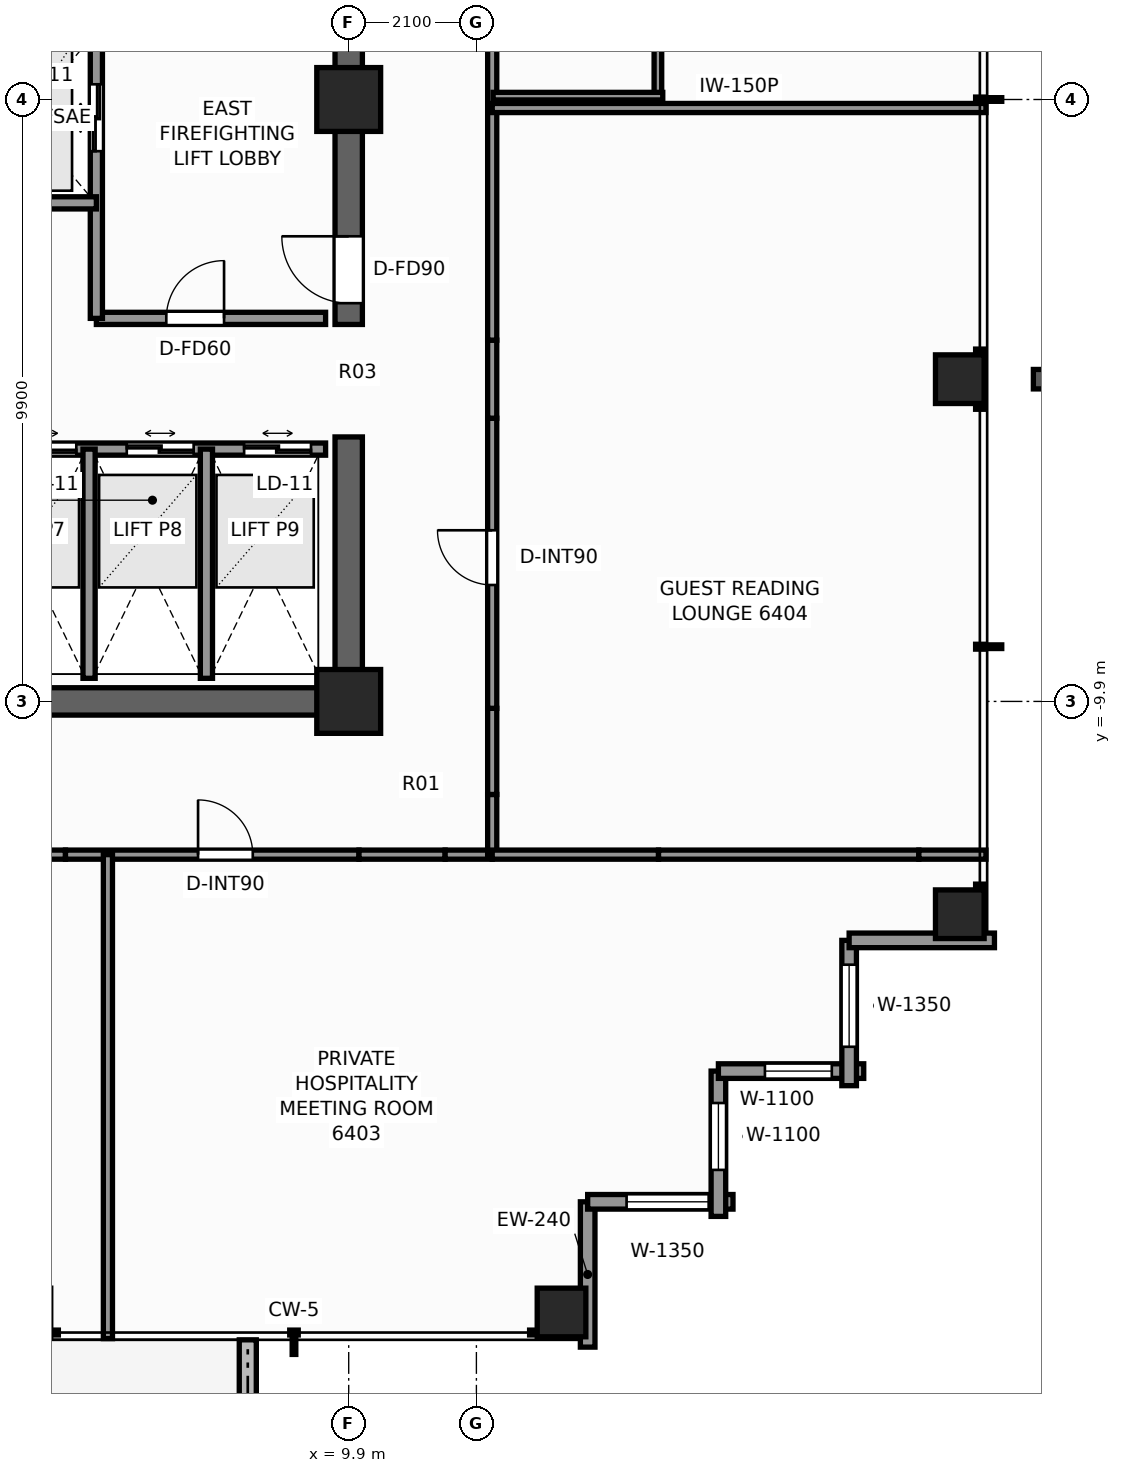
"""IFC4 building model, lengths in metres.
Left out: names, types, materials, properties, quantities, classifications, styles, units other than length and angle.
Written with IfcOpenShell. Run it as: python <this file> out.ifc"""

import sys

from ifc_helpers import new_model, si_unit, direction, frame, frame_2d, origin, origin_2d, place, context, subcontext, project, spatial, rectangle, extrude, element, fill, save


model = new_model("IFC4")
c1 = context("Model", 3, precision=1e-05, world=origin(), true_north=direction((0.0, 1.0)))
c2 = subcontext(c1, "Body", "Model", "MODEL_VIEW")
j1 = project(units=[si_unit("LENGTHUNIT", "METRE"), si_unit("PLANEANGLEUNIT", "RADIAN")], contexts=[c1])
p1 = place(None, origin())
s1 = spatial("IfcSite", under=j1, at=p1, CompositionType="ELEMENT")
p2 = place(p1, origin())
s2 = spatial("IfcBuilding", under=s1, at=p2, CompositionType="ELEMENT")
p3 = place(p2, frame((0.0, 0.0, 219.6)))
s3 = spatial("IfcBuildingStorey", under=s2, at=p3, CompositionType="ELEMENT", Elevation=219.6)
p4 = place(p3, frame((10.125, -9.9, 0.0), z_axis=(0.0, 0.0, 1.0), x_axis=(-1.0, 0.0, 0.0)))
e1 = element("IfcWall", 1, at=p4, inside=s3, PredefinedType="SHEAR", context=c2, shape_type="SweptSolid", body=[
    extrude(rectangle(XDim=11.985, YDim=0.45, at=frame_2d((5.993, 0.0))), origin(), (0.0, 0.0, 1.0), 3.3),
])
p5 = place(p3, frame((9.9, -9.675, 0.0), z_axis=(0.0, 0.0, 1.0), x_axis=(0.0, 1.0, 0.0)))
e2 = element("IfcWall", 2, at=p5, inside=s3, PredefinedType="SHEAR", context=c2, shape_type="SweptSolid", body=[
    extrude(rectangle(XDim=4.125, YDim=0.45, at=frame_2d((2.062, 0.0))), origin(), (0.0, 0.0, 1.0), 3.3),
])
p6 = place(p3, frame((9.9, -3.7, 0.0), z_axis=(0.0, 0.0, 1.0), x_axis=(0.0, 1.0, 0.0)))
e3 = element("IfcWall", 3, at=p6, inside=s3, PredefinedType="SHEAR", context=c2, shape_type="SweptSolid", body=[
    extrude(rectangle(XDim=13.375, YDim=0.45, at=frame_2d((6.688, 0.0))), origin(), (0.0, 0.0, 1.0), 3.3),
])
p7 = place(p6, frame((0.35, 0.0, 0.0)))
e4 = element("IfcOpeningElement", 4, at=p7, cuts=e3, PredefinedType="OPENING", context=c2, shape_type="SweptSolid", body=[
    extrude(rectangle(XDim=1.1, YDim=2.2, at=frame_2d((0.55, 1.1))), frame((0.0, 0.235, 0.0), z_axis=(0.0, -1.0, 0.0), x_axis=(1.0, 0.0, 0.0)), (0.0, 0.0, 1.0), 0.47),
])
for number, where, z_axis, x_axis in (
    (5, (9.9, -9.9, 0.0), (0.0, 0.0, 1.0), (1.0, 0.0, 0.0)),
    (6, (9.9, 0.0, 0.0), (0.0, 0.0, 1.0), (1.0, 0.0, 0.0)),
):
    element("IfcColumn", number, at=place(p3, frame(where, z_axis=z_axis, x_axis=x_axis)), inside=s3, PredefinedType="COLUMN", context=c2, shape_type="SweptSolid", body=[
        extrude(rectangle(XDim=1.05, YDim=1.05, at=origin_2d()), origin(), (0.0, 0.0, 1.0), 3.3),
    ])
for number, where, z_axis, x_axis in (
    (7, (13.4, -19.95, 0.0), (0.0, 0.0, 1.0), (1.0, 0.0, 0.0)),
    (8, (19.95, -13.4, 0.0), (0.0, 0.0, 1.0), (1.0, 0.0, 0.0)),
    (9, (19.95, -4.6, 0.0), (0.0, 0.0, 1.0), (1.0, 0.0, 0.0)),
):
    element("IfcColumn", number, at=place(p3, frame(where, z_axis=z_axis, x_axis=x_axis)), inside=s3, PredefinedType="COLUMN", context=c2, shape_type="SweptSolid", body=[
        extrude(rectangle(XDim=0.8, YDim=0.8, at=origin_2d()), origin(), (0.0, 0.0, 1.0), 3.3),
    ])
p8 = place(p3, frame((8.24, -21.866, -0.04), z_axis=(0.0, 0.0, 1.0), x_axis=(0.0, 1.0, 0.0)))
e10 = element("IfcWall", 10, at=p8, inside=s3, PredefinedType="PARAPET", context=c2, shape_type="SweptSolid", body=[
    extrude(rectangle(XDim=1.466, YDim=0.28, at=frame_2d((0.733, 0.0))), origin(), (0.0, 0.0, 1.0), 0.42),
])
p9 = place(p3, frame((13.83, -18.13, 0.0), z_axis=(0.0, 0.0, 1.0), x_axis=(0.0, -1.0, 0.0)))
e11 = element("IfcWall", 11, at=p9, inside=s3, PredefinedType="STANDARD", context=c2, shape_type="SweptSolid", body=[
    extrude(rectangle(XDim=2.39, YDim=0.24, at=frame_2d((1.195, 0.0))), origin(), (0.0, 0.0, 1.0), 1.275),
])
p10 = place(p3, frame((16.22, -18.13, 0.0), z_axis=(0.0, 0.0, 1.0), x_axis=(-1.0, 0.0, 0.0)))
e12 = element("IfcWall", 12, at=p10, inside=s3, PredefinedType="STANDARD", context=c2, shape_type="SweptSolid", body=[
    extrude(rectangle(XDim=2.39, YDim=0.24, at=frame_2d((1.195, 0.0))), origin(), (0.0, 0.0, 1.0), 2.463),
])
p11 = place(p10, frame((0.4, 0.0, 0.65)))
e13 = element("IfcOpeningElement", 13, at=p11, cuts=e12, PredefinedType="OPENING", context=c2, shape_type="SweptSolid", body=[
    extrude(rectangle(XDim=1.35, YDim=1.55, at=frame_2d((0.675, 0.775))), frame((0.0, 0.13, 0.0), z_axis=(0.0, -1.0, 0.0), x_axis=(1.0, 0.0, 0.0)), (0.0, 0.0, 1.0), 0.26),
])
p12 = place(p3, frame((15.98, -15.98, 0.0), z_axis=(0.0, 0.0, 1.0), x_axis=(0.0, -1.0, 0.0)))
e14 = element("IfcWall", 14, at=p12, inside=s3, PredefinedType="STANDARD", context=c2, shape_type="SweptSolid", body=[
    extrude(rectangle(XDim=2.39, YDim=0.24, at=frame_2d((1.195, 0.0))), origin(), (0.0, 0.0, 1.0), 2.463),
])
p13 = place(p12, frame((0.525, 0.0, 0.65)))
e15 = element("IfcOpeningElement", 15, at=p13, cuts=e14, PredefinedType="OPENING", context=c2, shape_type="SweptSolid", body=[
    extrude(rectangle(XDim=1.1, YDim=1.45, at=frame_2d((0.55, 0.725))), frame((0.0, 0.13, 0.0), z_axis=(0.0, -1.0, 0.0), x_axis=(1.0, 0.0, 0.0)), (0.0, 0.0, 1.0), 0.26),
])
p14 = place(p3, frame((18.37, -15.98, 0.0), z_axis=(0.0, 0.0, 1.0), x_axis=(-1.0, 0.0, 0.0)))
e16 = element("IfcWall", 16, at=p14, inside=s3, PredefinedType="STANDARD", context=c2, shape_type="SweptSolid", body=[
    extrude(rectangle(XDim=2.39, YDim=0.24, at=frame_2d((1.195, 0.0))), origin(), (0.0, 0.0, 1.0), 2.463),
])
p15 = place(p14, frame((0.525, 0.0, 0.65)))
e17 = element("IfcOpeningElement", 17, at=p15, cuts=e16, PredefinedType="OPENING", context=c2, shape_type="SweptSolid", body=[
    extrude(rectangle(XDim=1.1, YDim=1.45, at=frame_2d((0.55, 0.725))), frame((0.0, 0.13, 0.0), z_axis=(0.0, -1.0, 0.0), x_axis=(1.0, 0.0, 0.0)), (0.0, 0.0, 1.0), 0.26),
])
p16 = place(p3, frame((18.13, -13.83, 0.0), z_axis=(0.0, 0.0, 1.0), x_axis=(0.0, -1.0, 0.0)))
e18 = element("IfcWall", 18, at=p16, inside=s3, PredefinedType="STANDARD", context=c2, shape_type="SweptSolid", body=[
    extrude(rectangle(XDim=2.39, YDim=0.24, at=frame_2d((1.195, 0.0))), origin(), (0.0, 0.0, 1.0), 2.463),
])
p17 = place(p16, frame((0.4, 0.0, 0.65)))
e19 = element("IfcOpeningElement", 19, at=p17, cuts=e18, PredefinedType="OPENING", context=c2, shape_type="SweptSolid", body=[
    extrude(rectangle(XDim=1.35, YDim=1.55, at=frame_2d((0.675, 0.775))), frame((0.0, 0.13, 0.0), z_axis=(0.0, -1.0, 0.0), x_axis=(1.0, 0.0, 0.0)), (0.0, 0.0, 1.0), 0.26),
])
p18 = place(p3, frame((20.52, -13.83, 0.0), z_axis=(0.0, 0.0, 1.0), x_axis=(-1.0, 0.0, 0.0)))
e20 = element("IfcWall", 20, at=p18, inside=s3, PredefinedType="STANDARD", context=c2, shape_type="SweptSolid", body=[
    extrude(rectangle(XDim=2.39, YDim=0.24, at=frame_2d((1.195, 0.0))), origin(), (0.0, 0.0, 1.0), 1.275),
])
p19 = place(p3, frame((5.75, -3.6, 0.0), z_axis=(0.0, 0.0, 1.0), x_axis=(1.0, 0.0, 0.0)))
e21 = element("IfcWall", 21, at=p19, inside=s3, PredefinedType="SOLIDWALL", context=c2, shape_type="SweptSolid", body=[
    extrude(rectangle(XDim=3.77, YDim=0.2, at=frame_2d((1.885, 0.0))), origin(), (0.0, 0.0, 1.0), 3.08),
])
p20 = place(p19, frame((1.15, 0.0, 0.0)))
e22 = element("IfcOpeningElement", 22, at=p20, cuts=e21, PredefinedType="OPENING", context=c2, shape_type="SweptSolid", body=[
    extrude(rectangle(XDim=0.95, YDim=2.06, at=frame_2d((0.475, 1.03))), frame((0.0, 0.11, 0.0), z_axis=(0.0, -1.0, 0.0), x_axis=(1.0, 0.0, 0.0)), (0.0, 0.0, 1.0), 0.22),
])
p21 = place(p3, frame((5.75, -3.6, 0.0), z_axis=(0.0, 0.0, 1.0), x_axis=(0.0, 1.0, 0.0)))
e23 = element("IfcWall", 23, at=p21, inside=s3, PredefinedType="SOLIDWALL", context=c2, shape_type="SweptSolid", body=[
    extrude(rectangle(XDim=5.57, YDim=0.2, at=frame_2d((2.785, 0.0))), origin(), (0.0, 0.0, 1.0), 3.08),
])
p22 = place(p21, frame((2.75, 0.0, 0.0)))
e24 = element("IfcOpeningElement", 24, at=p22, cuts=e23, PredefinedType="OPENING", context=c2, shape_type="SweptSolid", body=[
    extrude(rectangle(XDim=1.1, YDim=2.2, at=frame_2d((0.55, 1.1))), frame((0.0, 0.11, 0.0), z_axis=(0.0, -1.0, 0.0), x_axis=(1.0, 0.0, 0.0)), (0.0, 0.0, 1.0), 0.22),
])
p23 = place(p3, frame((3.35, -1.7, 0.0), z_axis=(0.0, 0.0, 1.0), x_axis=(1.0, 0.0, 0.0)))
e25 = element("IfcWall", 25, at=p23, inside=s3, PredefinedType="SOLIDWALL", context=c2, shape_type="SweptSolid", body=[
    extrude(rectangle(XDim=2.4, YDim=0.2, at=frame_2d((1.2, 0.0))), origin(), (0.0, 0.0, 1.0), 3.08),
])
p24 = place(p3, frame((3.86, -5.75, 0.0), z_axis=(0.0, 0.0, 1.0), x_axis=(1.0, 0.0, 0.0)))
e26 = element("IfcWall", 26, at=p24, inside=s3, PredefinedType="SOLIDWALL", context=c2, shape_type="SweptSolid", body=[
    extrude(rectangle(XDim=5.66, YDim=0.2, at=frame_2d((2.83, 0.0))), origin(), (0.0, 0.0, 1.0), 3.08),
])
p25 = place(p24, frame((0.46, 0.0, 0.0)))
e27 = element("IfcOpeningElement", 27, at=p25, cuts=e26, PredefinedType="OPENING", context=c2, shape_type="SweptSolid", body=[
    extrude(rectangle(XDim=1.1, YDim=2.2, at=frame_2d((0.55, 1.1))), frame((0.0, 0.11, 0.0), z_axis=(0.0, -1.0, 0.0), x_axis=(1.0, 0.0, 0.0)), (0.0, 0.0, 1.0), 0.22),
])
p26 = place(p24, frame((2.39, 0.0, 0.0)))
e28 = element("IfcOpeningElement", 28, at=p26, cuts=e26, PredefinedType="OPENING", context=c2, shape_type="SweptSolid", body=[
    extrude(rectangle(XDim=1.1, YDim=2.2, at=frame_2d((0.55, 1.1))), frame((0.0, 0.11, 0.0), z_axis=(0.0, -1.0, 0.0), x_axis=(1.0, 0.0, 0.0)), (0.0, 0.0, 1.0), 0.22),
])
p27 = place(p24, frame((4.32, 0.0, 0.0)))
e29 = element("IfcOpeningElement", 29, at=p27, cuts=e26, PredefinedType="OPENING", context=c2, shape_type="SweptSolid", body=[
    extrude(rectangle(XDim=1.1, YDim=2.2, at=frame_2d((0.55, 1.1))), frame((0.0, 0.11, 0.0), z_axis=(0.0, -1.0, 0.0), x_axis=(1.0, 0.0, 0.0)), (0.0, 0.0, 1.0), 0.22),
])
for number, where, z_axis, x_axis in (
    (30, (5.63, -9.52, 0.0), (0.0, 0.0, 1.0), (0.0, 1.0, 0.0)),
    (31, (7.56, -9.52, 0.0), (0.0, 0.0, 1.0), (0.0, 1.0, 0.0)),
):
    element("IfcWall", number, at=place(p3, frame(where, z_axis=z_axis, x_axis=x_axis)), inside=s3, PredefinedType="SOLIDWALL", context=c2, shape_type="SweptSolid", body=[
        extrude(rectangle(XDim=3.77, YDim=0.2, at=frame_2d((1.885, 0.0))), origin(), (0.0, 0.0, 1.0), 3.08),
    ])
p28 = place(p3, frame((3.958, -12.42, 0.0), z_axis=(0.0, 0.0, 1.0), x_axis=(1.0, 0.0, 0.0)))
e32 = element("IfcWall", 32, at=p28, inside=s3, PredefinedType="PARTITIONING", context=c2, shape_type="SweptSolid", body=[
    extrude(rectangle(XDim=1.284, YDim=0.15, at=frame_2d((0.642, 0.0))), origin(), (0.0, 0.0, 1.0), 1.265),
])
p29 = place(p3, frame((5.242, -12.42, 0.0), z_axis=(0.0, 0.0, 1.0), x_axis=(1.0, 0.0, 0.0)))
e33 = element("IfcWall", 33, at=p29, inside=s3, PredefinedType="PARTITIONING", context=c2, shape_type="SweptSolid", body=[
    extrude(rectangle(XDim=4.827, YDim=0.15, at=frame_2d((2.414, 0.0))), origin(), (0.0, 0.0, 1.0), 3.08),
])
p30 = place(p29, frame((2.18, 0.0, 0.0)))
e34 = element("IfcOpeningElement", 34, at=p30, cuts=e33, PredefinedType="OPENING", context=c2, shape_type="SweptSolid", body=[
    extrude(rectangle(XDim=0.9, YDim=2.06, at=frame_2d((0.45, 1.03))), frame((0.0, 0.085, 0.0), z_axis=(0.0, -1.0, 0.0), x_axis=(1.0, 0.0, 0.0)), (0.0, 0.0, 1.0), 0.17),
])
p31 = place(p3, frame((10.069, -12.42, 0.0), z_axis=(0.0, 0.0, 1.0), x_axis=(1.0, 0.0, 0.0)))
e35 = element("IfcWall", 35, at=p31, inside=s3, PredefinedType="PARTITIONING", context=c2, shape_type="SweptSolid", body=[
    extrude(rectangle(XDim=1.417, YDim=0.15, at=frame_2d((0.708, 0.0))), origin(), (0.0, 0.0, 1.0), 1.265),
])
p32 = place(p3, frame((11.486, -12.42, 0.0), z_axis=(0.0, 0.0, 1.0), x_axis=(1.0, 0.0, 0.0)))
e36 = element("IfcWall", 36, at=p32, inside=s3, PredefinedType="PARTITIONING", context=c2, shape_type="SweptSolid", body=[
    extrude(rectangle(XDim=0.774, YDim=0.15, at=frame_2d((0.387, 0.0))), origin(), (0.0, 0.0, 1.0), 3.08),
])
p33 = place(p3, frame((12.26, -12.42, 0.0), z_axis=(0.0, 0.0, 1.0), x_axis=(0.0, 1.0, 0.0)))
e37 = element("IfcWall", 37, at=p33, inside=s3, PredefinedType="PARTITIONING", context=c2, shape_type="SweptSolid", body=[
    extrude(rectangle(XDim=0.99, YDim=0.15, at=frame_2d((0.495, 0.0))), origin(), (0.0, 0.0, 1.0), 3.08),
])
p34 = place(p3, frame((12.26, -11.43, 0.0), z_axis=(0.0, 0.0, 1.0), x_axis=(0.0, 1.0, 0.0)))
e38 = element("IfcWall", 38, at=p34, inside=s3, PredefinedType="PARTITIONING", context=c2, shape_type="SweptSolid", body=[
    extrude(rectangle(XDim=1.417, YDim=0.15, at=frame_2d((0.708, 0.0))), origin(), (0.0, 0.0, 1.0), 1.265),
])
p35 = place(p3, frame((12.26, -10.014, 0.0), z_axis=(0.0, 0.0, 1.0), x_axis=(0.0, 1.0, 0.0)))
e39 = element("IfcWall", 39, at=p35, inside=s3, PredefinedType="PARTITIONING", context=c2, shape_type="SweptSolid", body=[
    extrude(rectangle(XDim=4.772, YDim=0.15, at=frame_2d((2.386, 0.0))), origin(), (0.0, 0.0, 1.0), 3.08),
])
p36 = place(p35, frame((2.029, 0.0, 0.0)))
e40 = element("IfcOpeningElement", 40, at=p36, cuts=e39, PredefinedType="OPENING", context=c2, shape_type="SweptSolid", body=[
    extrude(rectangle(XDim=0.9, YDim=2.06, at=frame_2d((0.45, 1.03))), frame((0.0, 0.085, 0.0), z_axis=(0.0, -1.0, 0.0), x_axis=(1.0, 0.0, 0.0)), (0.0, 0.0, 1.0), 0.17),
])
p37 = place(p3, frame((12.26, -5.242, 0.0), z_axis=(0.0, 0.0, 1.0), x_axis=(0.0, 1.0, 0.0)))
e41 = element("IfcWall", 41, at=p37, inside=s3, PredefinedType="PARTITIONING", context=c2, shape_type="SweptSolid", body=[
    extrude(rectangle(XDim=1.284, YDim=0.15, at=frame_2d((0.642, 0.0))), origin(), (0.0, 0.0, 1.0), 1.265),
])
p38 = place(p3, frame((12.26, -3.958, 0.0), z_axis=(0.0, 0.0, 1.0), x_axis=(0.0, 1.0, 0.0)))
e42 = element("IfcWall", 42, at=p38, inside=s3, PredefinedType="PARTITIONING", context=c2, shape_type="SweptSolid", body=[
    extrude(rectangle(XDim=7.916, YDim=0.15, at=frame_2d((3.958, 0.0))), origin(), (0.0, 0.0, 1.0), 2.369),
])
p39 = place(p3, frame((12.26, -12.42, 0.0), z_axis=(0.0, 0.0, 1.0), x_axis=(1.0, 0.0, 0.0)))
e43 = element("IfcWall", 43, at=p39, inside=s3, PredefinedType="PARTITIONING", context=c2, shape_type="SweptSolid", body=[
    extrude(rectangle(XDim=2.735, YDim=0.15, at=frame_2d((1.368, 0.0))), origin(), (0.0, 0.0, 1.0), 3.08),
])
p40 = place(p3, frame((14.995, -12.42, 0.0), z_axis=(0.0, 0.0, 1.0), x_axis=(1.0, 0.0, 0.0)))
e44 = element("IfcWall", 44, at=p40, inside=s3, PredefinedType="PARTITIONING", context=c2, shape_type="SweptSolid", body=[
    extrude(rectangle(XDim=4.281, YDim=0.15, at=frame_2d((2.141, 0.0))), origin(), (0.0, 0.0, 1.0), 1.265),
])
p41 = place(p3, frame((19.277, -12.42, 0.0), z_axis=(0.0, 0.0, 1.0), x_axis=(1.0, 0.0, 0.0)))
e45 = element("IfcWall", 45, at=p41, inside=s3, PredefinedType="PARTITIONING", context=c2, shape_type="SweptSolid", body=[
    extrude(rectangle(XDim=1.103, YDim=0.15, at=frame_2d((0.552, 0.0))), origin(), (0.0, 0.0, 1.0), 2.453),
])
p42 = place(p3, frame((5.94, -20.38, 0.0), z_axis=(0.0, 0.0, 1.0), x_axis=(0.0, 1.0, 0.0)))
e46 = element("IfcWall", 46, at=p42, inside=s3, PredefinedType="PARTITIONING", context=c2, shape_type="SweptSolid", body=[
    extrude(rectangle(XDim=7.96, YDim=0.15, at=frame_2d((3.98, 0.0))), origin(), (0.0, 0.0, 1.0), 2.453),
])
p43 = place(p3, frame((12.26, -0.14, 0.0), z_axis=(0.0, 0.0, 1.0), x_axis=(1.0, 0.0, 0.0)))
e47 = element("IfcWall", 47, at=p43, inside=s3, PredefinedType="PARTITIONING", context=c2, shape_type="SweptSolid", body=[
    extrude(rectangle(XDim=8.12, YDim=0.15, at=frame_2d((4.06, 0.0))), origin(), (0.0, 0.0, 1.0), 2.453),
])
p44 = place(p3, frame((14.985, -0.005, 0.0), z_axis=(0.0, 0.0, 1.0), x_axis=(0.0, 1.0, 0.0)))
e48 = element("IfcWall", 48, at=p44, inside=s3, PredefinedType="PARTITIONING", context=c2, shape_type="SweptSolid", body=[
    extrude(rectangle(XDim=2.37, YDim=0.125, at=frame_2d((1.185, 0.0))), origin(), (0.0, 0.0, 1.0), 2.605),
])
p45 = place(p3, frame((12.275, 0.055, 0.0), z_axis=(0.0, 0.0, 1.0), x_axis=(1.0, 0.0, 0.0)))
e49 = element("IfcWall", 49, at=p45, inside=s3, PredefinedType="PARTITIONING", context=c2, shape_type="SweptSolid", body=[
    extrude(rectangle(XDim=2.79, YDim=0.125, at=frame_2d((1.395, 0.0))), origin(), (0.0, 0.0, 1.0), 2.605),
])
p46 = place(p11, origin())
e50 = element("IfcWindow", 50, at=p46, inside=s3, PartitioningType="SINGLE_PANEL", PredefinedType="WINDOW", context=c2, shape_type="SweptSolid", body=[
    extrude(rectangle(XDim=1.35, YDim=1.55, at=frame_2d((0.675, 0.775))), frame((0.0, 0.03, 0.0), z_axis=(0.0, -1.0, 0.0), x_axis=(1.0, 0.0, 0.0)), (0.0, 0.0, 1.0), 0.06),
])
fill(e13, e50)
p47 = place(p13, origin())
e51 = element("IfcWindow", 51, at=p47, inside=s3, PartitioningType="SINGLE_PANEL", PredefinedType="WINDOW", context=c2, shape_type="SweptSolid", body=[
    extrude(rectangle(XDim=1.1, YDim=1.45, at=frame_2d((0.55, 0.725))), frame((0.0, 0.03, 0.0), z_axis=(0.0, -1.0, 0.0), x_axis=(1.0, 0.0, 0.0)), (0.0, 0.0, 1.0), 0.06),
])
fill(e15, e51)
p48 = place(p15, origin())
e52 = element("IfcWindow", 52, at=p48, inside=s3, PartitioningType="SINGLE_PANEL", PredefinedType="WINDOW", context=c2, shape_type="SweptSolid", body=[
    extrude(rectangle(XDim=1.1, YDim=1.45, at=frame_2d((0.55, 0.725))), frame((0.0, 0.03, 0.0), z_axis=(0.0, -1.0, 0.0), x_axis=(1.0, 0.0, 0.0)), (0.0, 0.0, 1.0), 0.06),
])
fill(e17, e52)
p49 = place(p17, origin())
e53 = element("IfcWindow", 53, at=p49, inside=s3, PartitioningType="SINGLE_PANEL", PredefinedType="WINDOW", context=c2, shape_type="SweptSolid", body=[
    extrude(rectangle(XDim=1.35, YDim=1.55, at=frame_2d((0.675, 0.775))), frame((0.0, 0.03, 0.0), z_axis=(0.0, -1.0, 0.0), x_axis=(1.0, 0.0, 0.0)), (0.0, 0.0, 1.0), 0.06),
])
fill(e19, e53)
p50 = place(p7, origin())
e54 = element("IfcDoor", 54, at=p50, inside=s3, OperationType="SINGLE_SWING_RIGHT", PredefinedType="DOOR", context=c2, shape_type="SweptSolid", body=[
    extrude(rectangle(XDim=1.1, YDim=2.2, at=frame_2d((0.55, 1.1))), frame((0.0, 0.025, 0.0), z_axis=(0.0, -1.0, 0.0), x_axis=(1.0, 0.0, 0.0)), (0.0, 0.0, 1.0), 0.05),
])
fill(e4, e54)
p51 = place(p22, origin())
e55 = element("IfcDoor", 55, at=p51, inside=s3, OperationType="DOUBLE_DOOR_SLIDING", PredefinedType="DOOR", context=c2, shape_type="SweptSolid", body=[
    extrude(rectangle(XDim=1.1, YDim=2.2, at=frame_2d((0.55, 1.1))), frame((0.0, 0.025, 0.0), z_axis=(0.0, -1.0, 0.0), x_axis=(1.0, 0.0, 0.0)), (0.0, 0.0, 1.0), 0.05),
])
fill(e24, e55)
p52 = place(p25, origin())
e56 = element("IfcDoor", 56, at=p52, inside=s3, OperationType="DOUBLE_DOOR_SLIDING", PredefinedType="DOOR", context=c2, shape_type="SweptSolid", body=[
    extrude(rectangle(XDim=1.1, YDim=2.2, at=frame_2d((0.55, 1.1))), frame((0.0, 0.025, 0.0), z_axis=(0.0, -1.0, 0.0), x_axis=(1.0, 0.0, 0.0)), (0.0, 0.0, 1.0), 0.05),
])
fill(e27, e56)
p53 = place(p26, origin())
e57 = element("IfcDoor", 57, at=p53, inside=s3, OperationType="DOUBLE_DOOR_SLIDING", PredefinedType="DOOR", context=c2, shape_type="SweptSolid", body=[
    extrude(rectangle(XDim=1.1, YDim=2.2, at=frame_2d((0.55, 1.1))), frame((0.0, 0.025, 0.0), z_axis=(0.0, -1.0, 0.0), x_axis=(1.0, 0.0, 0.0)), (0.0, 0.0, 1.0), 0.05),
])
fill(e28, e57)
p54 = place(p27, origin())
e58 = element("IfcDoor", 58, at=p54, inside=s3, OperationType="DOUBLE_DOOR_SLIDING", PredefinedType="DOOR", context=c2, shape_type="SweptSolid", body=[
    extrude(rectangle(XDim=1.1, YDim=2.2, at=frame_2d((0.55, 1.1))), frame((0.0, 0.025, 0.0), z_axis=(0.0, -1.0, 0.0), x_axis=(1.0, 0.0, 0.0)), (0.0, 0.0, 1.0), 0.05),
])
fill(e29, e58)
p55 = place(p20, origin())
e59 = element("IfcDoor", 59, at=p55, inside=s3, OperationType="SINGLE_SWING_RIGHT", PredefinedType="DOOR", context=c2, shape_type="SweptSolid", body=[
    extrude(rectangle(XDim=0.95, YDim=2.06, at=frame_2d((0.475, 1.03))), frame((0.0, 0.025, 0.0), z_axis=(0.0, -1.0, 0.0), x_axis=(1.0, 0.0, 0.0)), (0.0, 0.0, 1.0), 0.05),
])
fill(e22, e59)
p56 = place(p30, origin())
e60 = element("IfcDoor", 60, at=p56, inside=s3, OperationType="SINGLE_SWING_LEFT", PredefinedType="DOOR", context=c2, shape_type="SweptSolid", body=[
    extrude(rectangle(XDim=0.9, YDim=2.06, at=frame_2d((0.45, 1.03))), frame((0.0, 0.025, 0.0), z_axis=(0.0, -1.0, 0.0), x_axis=(1.0, 0.0, 0.0)), (0.0, 0.0, 1.0), 0.05),
])
fill(e34, e60)
p57 = place(p36, origin())
e61 = element("IfcDoor", 61, at=p57, inside=s3, OperationType="SINGLE_SWING_RIGHT", PredefinedType="DOOR", context=c2, shape_type="SweptSolid", body=[
    extrude(rectangle(XDim=0.9, YDim=2.06, at=frame_2d((0.45, 1.03))), frame((0.0, 0.025, 0.0), z_axis=(0.0, -1.0, 0.0), x_axis=(1.0, 0.0, 0.0)), (0.0, 0.0, 1.0), 0.05),
])
fill(e40, e61)
save(model, sys.argv[1])
